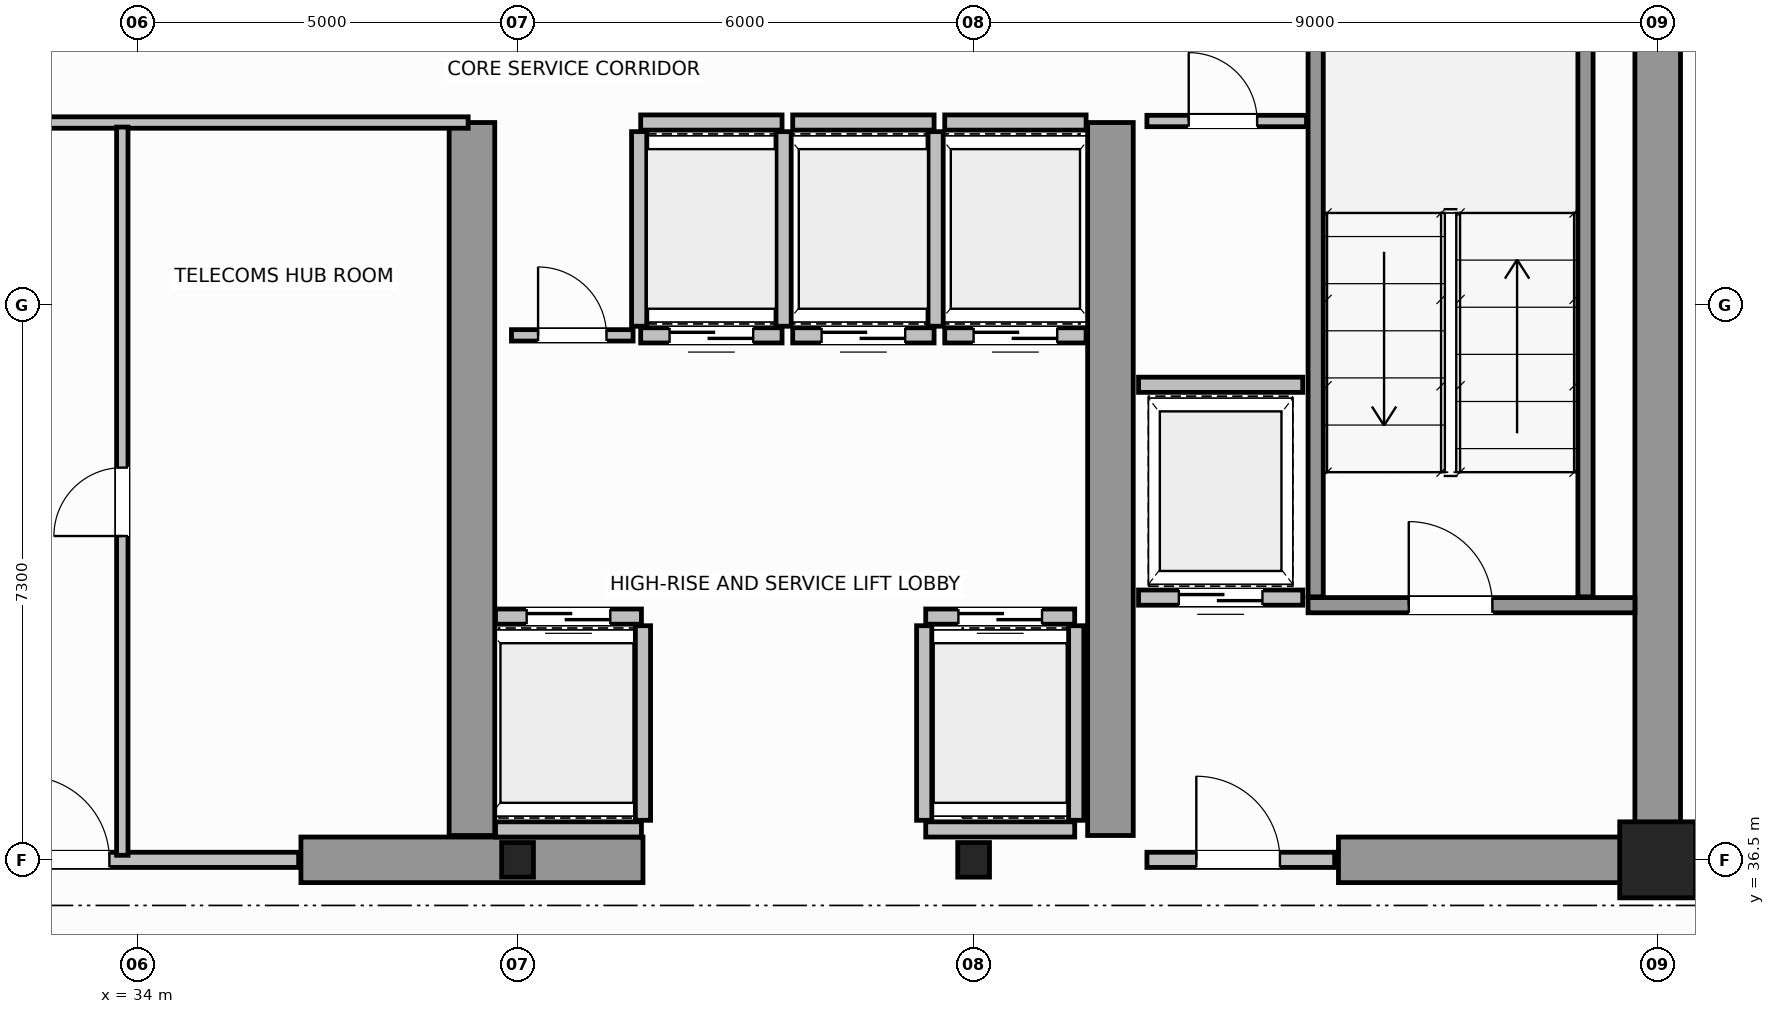
"""IFC4 building model, lengths in metres.
Left out: names, types, materials, properties, quantities, classifications, styles, units other than length and angle.
Written with IfcOpenShell. Run it as: python <this file> out.ifc"""

import sys

from ifc_helpers import new_model, si_unit, direction, frame, frame_2d, origin, origin_2d, place, context, subcontext, project, spatial, rectangle, i_section, extrude, source, transform, mapped, element, fill, save


model = new_model("IFC4")
c1 = context("Model", 3, precision=1e-05, world=origin(), true_north=direction((0.0, 1.0)))
c2 = subcontext(c1, "Body", "Model", "MODEL_VIEW")
j1 = project(units=[si_unit("LENGTHUNIT", "METRE"), si_unit("PLANEANGLEUNIT", "RADIAN")], contexts=[c1])
p1 = place(None, origin())
s1 = spatial("IfcSite", under=j1, at=p1, CompositionType="ELEMENT")
p2 = place(p1, origin())
s2 = spatial("IfcBuilding", under=s1, at=p2, CompositionType="ELEMENT")
p3 = place(p2, frame((0.0, 0.0, 238.4)))
s3 = spatial("IfcBuildingStorey", under=s2, at=p3, CompositionType="ELEMENT", Elevation=238.4)
m1 = source(origin(), c2, "Body", "SweptSolid", [
    extrude(i_section(OverallWidth=0.418, OverallDepth=0.455, WebThickness=0.042, FlangeThickness=0.058, FilletRadius=0.015, at=origin_2d()), origin(), (0.0, 0.0, 1.0), 3.8),
])
for number, where, z_axis, x_axis in (
    (1, (39.0, 36.5, 0.0), (0.0, 0.0, 1.0), (1.0, 0.0, 0.0)),
    (2, (45.0, 36.5, 0.0), (0.0, 0.0, 1.0), (1.0, 0.0, 0.0)),
):
    element("IfcColumn", number, at=place(p3, frame(where, z_axis=z_axis, x_axis=x_axis)), inside=s3, PredefinedType="COLUMN", context=c2, shape_type="MappedRepresentation", body=[
        mapped(m1, transform((0.0, 0.0, 0.0), scale=1.0)),
    ])
m2 = source(origin(), c2, "Body", "SweptSolid", [
    extrude(rectangle(XDim=1.0, YDim=1.0, at=origin_2d()), origin(), (0.0, 0.0, 1.0), 3.8),
])
p4 = place(p3, frame((54.0, 36.5, 0.0), z_axis=(0.0, 0.0, 1.0), x_axis=(1.0, 0.0, 0.0)))
e3 = element("IfcColumn", 3, at=p4, inside=s3, PredefinedType="COLUMN", context=c2, shape_type="MappedRepresentation", body=[
    mapped(m2, transform((0.0, 0.0, 0.0), scale=1.0)),
])
p5 = place(p3, frame((54.0, 36.5, 0.0), z_axis=(0.0, 0.0, 1.0), x_axis=(0.0, 1.0, 0.0)))
e4 = element("IfcWall", 4, at=p5, inside=s3, PredefinedType="SHEAR", context=c2, shape_type="SweptSolid", body=[
    extrude(rectangle(XDim=14.5, YDim=0.6, at=frame_2d((7.25, 0.0))), origin(), (0.0, 0.0, 1.0), 3.8),
])
p6 = place(p3, frame((36.15, 36.5, 0.0), z_axis=(0.0, 0.0, 1.0), x_axis=(1.0, 0.0, 0.0)))
e5 = element("IfcWall", 5, at=p6, inside=s3, PredefinedType="SHEAR", context=c2, shape_type="SweptSolid", body=[
    extrude(rectangle(XDim=4.5, YDim=0.6, at=frame_2d((2.25, 0.0))), origin(), (0.0, 0.0, 1.0), 3.8),
])
p7 = place(p3, frame((49.8, 36.5, 0.0), z_axis=(0.0, 0.0, 1.0), x_axis=(1.0, 0.0, 0.0)))
e6 = element("IfcWall", 6, at=p7, inside=s3, PredefinedType="SHEAR", context=c2, shape_type="SweptSolid", body=[
    extrude(rectangle(XDim=3.88, YDim=0.6, at=frame_2d((1.94, 0.0))), origin(), (0.0, 0.0, 1.0), 2.58),
])
for number, where, z_axis, x_axis in (
    (7, (38.4, 36.82, 0.0), (0.0, 0.0, 1.0), (0.0, 1.0, 0.0)),
    (8, (46.8, 36.82, 0.0), (0.0, 0.0, 1.0), (0.0, 1.0, 0.0)),
):
    element("IfcWall", number, at=place(p3, frame(where, z_axis=z_axis, x_axis=x_axis)), inside=s3, PredefinedType="SHEAR", context=c2, shape_type="SweptSolid", body=[
        extrude(rectangle(XDim=9.38, YDim=0.6, at=frame_2d((4.69, 0.0))), origin(), (0.0, 0.0, 1.0), 3.8),
    ])
p8 = place(p3, frame((49.4, 39.85, 0.0), z_axis=(0.0, 0.0, 1.0), x_axis=(1.0, 0.0, 0.0)))
e9 = element("IfcWall", 9, at=p8, inside=s3, PredefinedType="SOLIDWALL", context=c2, shape_type="SweptSolid", body=[
    extrude(rectangle(XDim=4.3, YDim=0.2, at=frame_2d((2.15, 0.0))), origin(), (0.0, 0.0, 1.0), 3.8),
])
p9 = place(p8, frame((1.325, 0.0, 0.0)))
e10 = element("IfcOpeningElement", 10, at=p9, cuts=e9, PredefinedType="OPENING", context=c2, shape_type="SweptSolid", body=[
    extrude(rectangle(XDim=1.1, YDim=2.15, at=frame_2d((0.55, 1.075))), frame((0.0, 0.11, 0.0), z_axis=(0.0, -1.0, 0.0), x_axis=(1.0, 0.0, 0.0)), (0.0, 0.0, 1.0), 0.22),
])
for number, where, z_axis, x_axis in (
    (11, (49.5, 39.96, 0.0), (0.0, 0.0, 1.0), (0.0, 1.0, 0.0)),
    (12, (53.05, 39.96, 0.0), (0.0, 0.0, 1.0), (0.0, 1.0, 0.0)),
):
    element("IfcWall", number, at=place(p3, frame(where, z_axis=z_axis, x_axis=x_axis)), inside=s3, PredefinedType="SOLIDWALL", context=c2, shape_type="SweptSolid", body=[
        extrude(rectangle(XDim=9.93, YDim=0.2, at=frame_2d((4.965, 0.0))), origin(), (0.0, 0.0, 1.0), 3.8),
    ])
p10 = place(p3, frame((47.28, 36.5, 0.0), z_axis=(0.0, 0.0, 1.0), x_axis=(1.0, 0.0, 0.0)))
e13 = element("IfcWall", 13, at=p10, inside=s3, PredefinedType="SOLIDWALL", context=c2, shape_type="SweptSolid", body=[
    extrude(rectangle(XDim=2.47, YDim=0.2, at=frame_2d((1.235, 0.0))), origin(), (0.0, 0.0, 1.0), 2.57),
])
p11 = place(p10, frame((0.65, 0.0, 0.0)))
e14 = element("IfcOpeningElement", 14, at=p11, cuts=e13, PredefinedType="OPENING", context=c2, shape_type="SweptSolid", body=[
    extrude(rectangle(XDim=1.1, YDim=2.15, at=frame_2d((0.55, 1.075))), frame((0.0, 0.11, 0.0), z_axis=(0.0, -1.0, 0.0), x_axis=(1.0, 0.0, 0.0)), (0.0, 0.0, 1.0), 0.22),
])
p12 = place(p3, frame((38.71, 39.7, 0.0), z_axis=(0.0, 0.0, 1.0), x_axis=(1.0, 0.0, 0.0)))
e15 = element("IfcWall", 15, at=p12, inside=s3, PredefinedType="SOLIDWALL", context=c2, shape_type="SweptSolid", body=[
    extrude(rectangle(XDim=1.92, YDim=0.2, at=frame_2d((0.96, 0.0))), origin(), (0.0, 0.0, 1.0), 3.58),
])
p13 = place(p12, frame((0.41, 0.0, 0.0)))
e16 = element("IfcOpeningElement", 16, at=p13, cuts=e15, PredefinedType="OPENING", context=c2, shape_type="SweptSolid", body=[
    extrude(rectangle(XDim=1.1, YDim=2.15, at=frame_2d((0.55, 1.075))), frame((0.0, 0.11, 0.0), z_axis=(0.0, -1.0, 0.0), x_axis=(1.0, 0.0, 0.0)), (0.0, 0.0, 1.0), 0.22),
])
p14 = place(p3, frame((38.71, 36.9, 0.0), z_axis=(0.0, 0.0, 1.0), x_axis=(1.0, 0.0, 0.0)))
e17 = element("IfcWall", 17, at=p14, inside=s3, PredefinedType="SOLIDWALL", context=c2, shape_type="SweptSolid", body=[
    extrude(rectangle(XDim=1.92, YDim=0.2, at=frame_2d((0.96, 0.0))), origin(), (0.0, 0.0, 1.0), 3.58),
])
p15 = place(p3, frame((40.65, 37.02, 0.0), z_axis=(0.0, 0.0, 1.0), x_axis=(0.0, 1.0, 0.0)))
e18 = element("IfcWall", 18, at=p15, inside=s3, PredefinedType="SOLIDWALL", context=c2, shape_type="SweptSolid", body=[
    extrude(rectangle(XDim=2.56, YDim=0.2, at=frame_2d((1.28, 0.0))), origin(), (0.0, 0.0, 1.0), 3.58),
])
p16 = place(p3, frame((44.37, 39.7, 0.0), z_axis=(0.0, 0.0, 1.0), x_axis=(1.0, 0.0, 0.0)))
e19 = element("IfcWall", 19, at=p16, inside=s3, PredefinedType="SOLIDWALL", context=c2, shape_type="SweptSolid", body=[
    extrude(rectangle(XDim=1.96, YDim=0.2, at=frame_2d((0.98, 0.0))), origin(), (0.0, 0.0, 1.0), 3.58),
])
p17 = place(p16, frame((0.43, 0.0, 0.0)))
e20 = element("IfcOpeningElement", 20, at=p17, cuts=e19, PredefinedType="OPENING", context=c2, shape_type="SweptSolid", body=[
    extrude(rectangle(XDim=1.1, YDim=2.15, at=frame_2d((0.55, 1.075))), frame((0.0, 0.11, 0.0), z_axis=(0.0, -1.0, 0.0), x_axis=(1.0, 0.0, 0.0)), (0.0, 0.0, 1.0), 0.22),
])
p18 = place(p3, frame((44.37, 36.9, 0.0), z_axis=(0.0, 0.0, 1.0), x_axis=(1.0, 0.0, 0.0)))
e21 = element("IfcWall", 21, at=p18, inside=s3, PredefinedType="SOLIDWALL", context=c2, shape_type="SweptSolid", body=[
    extrude(rectangle(XDim=1.96, YDim=0.2, at=frame_2d((0.98, 0.0))), origin(), (0.0, 0.0, 1.0), 2.57),
])
for number, where, z_axis, x_axis in (
    (22, (44.35, 37.02, 0.0), (0.0, 0.0, 1.0), (0.0, 1.0, 0.0)),
    (23, (46.35, 37.02, 0.0), (0.0, 0.0, 1.0), (0.0, 1.0, 0.0)),
):
    element("IfcWall", number, at=place(p3, frame(where, z_axis=z_axis, x_axis=x_axis)), inside=s3, PredefinedType="SOLIDWALL", context=c2, shape_type="SweptSolid", body=[
        extrude(rectangle(XDim=2.56, YDim=0.2, at=frame_2d((1.28, 0.0))), origin(), (0.0, 0.0, 1.0), 3.58),
    ])
p19 = place(p3, frame((40.62, 43.4, 0.0), z_axis=(0.0, 0.0, 1.0), x_axis=(1.0, 0.0, 0.0)))
e24 = element("IfcWall", 24, at=p19, inside=s3, PredefinedType="SOLIDWALL", context=c2, shape_type="SweptSolid", body=[
    extrude(rectangle(XDim=1.86, YDim=0.2, at=frame_2d((0.93, 0.0))), origin(), (0.0, 0.0, 1.0), 3.58),
])
p20 = place(p19, frame((0.38, 0.0, 0.0)))
e25 = element("IfcOpeningElement", 25, at=p20, cuts=e24, PredefinedType="OPENING", context=c2, shape_type="SweptSolid", body=[
    extrude(rectangle(XDim=1.1, YDim=2.15, at=frame_2d((0.55, 1.075))), frame((0.0, 0.11, 0.0), z_axis=(0.0, -1.0, 0.0), x_axis=(1.0, 0.0, 0.0)), (0.0, 0.0, 1.0), 0.22),
])
p21 = place(p3, frame((40.62, 46.2, 0.0), z_axis=(0.0, 0.0, 1.0), x_axis=(1.0, 0.0, 0.0)))
e26 = element("IfcWall", 26, at=p21, inside=s3, PredefinedType="SOLIDWALL", context=c2, shape_type="SweptSolid", body=[
    extrude(rectangle(XDim=1.86, YDim=0.2, at=frame_2d((0.93, 0.0))), origin(), (0.0, 0.0, 1.0), 3.58),
])
for number, where, z_axis, x_axis in (
    (27, (40.6, 43.52, 0.0), (0.0, 0.0, 1.0), (0.0, 1.0, 0.0)),
    (28, (42.5, 43.52, 0.0), (0.0, 0.0, 1.0), (0.0, 1.0, 0.0)),
):
    element("IfcWall", number, at=place(p3, frame(where, z_axis=z_axis, x_axis=x_axis)), inside=s3, PredefinedType="SOLIDWALL", context=c2, shape_type="SweptSolid", body=[
        extrude(rectangle(XDim=2.56, YDim=0.2, at=frame_2d((1.28, 0.0))), origin(), (0.0, 0.0, 1.0), 3.58),
    ])
p22 = place(p3, frame((42.62, 43.4, 0.0), z_axis=(0.0, 0.0, 1.0), x_axis=(1.0, 0.0, 0.0)))
e29 = element("IfcWall", 29, at=p22, inside=s3, PredefinedType="SOLIDWALL", context=c2, shape_type="SweptSolid", body=[
    extrude(rectangle(XDim=1.86, YDim=0.2, at=frame_2d((0.93, 0.0))), origin(), (0.0, 0.0, 1.0), 3.58),
])
p23 = place(p22, frame((0.38, 0.0, 0.0)))
e30 = element("IfcOpeningElement", 30, at=p23, cuts=e29, PredefinedType="OPENING", context=c2, shape_type="SweptSolid", body=[
    extrude(rectangle(XDim=1.1, YDim=2.15, at=frame_2d((0.55, 1.075))), frame((0.0, 0.11, 0.0), z_axis=(0.0, -1.0, 0.0), x_axis=(1.0, 0.0, 0.0)), (0.0, 0.0, 1.0), 0.22),
])
p24 = place(p3, frame((42.62, 46.2, 0.0), z_axis=(0.0, 0.0, 1.0), x_axis=(1.0, 0.0, 0.0)))
e31 = element("IfcWall", 31, at=p24, inside=s3, PredefinedType="SOLIDWALL", context=c2, shape_type="SweptSolid", body=[
    extrude(rectangle(XDim=1.86, YDim=0.2, at=frame_2d((0.93, 0.0))), origin(), (0.0, 0.0, 1.0), 3.58),
])
p25 = place(p3, frame((44.5, 43.52, 0.0), z_axis=(0.0, 0.0, 1.0), x_axis=(0.0, 1.0, 0.0)))
e32 = element("IfcWall", 32, at=p25, inside=s3, PredefinedType="SOLIDWALL", context=c2, shape_type="SweptSolid", body=[
    extrude(rectangle(XDim=2.56, YDim=0.2, at=frame_2d((1.28, 0.0))), origin(), (0.0, 0.0, 1.0), 3.58),
])
p26 = place(p3, frame((44.62, 43.4, 0.0), z_axis=(0.0, 0.0, 1.0), x_axis=(1.0, 0.0, 0.0)))
e33 = element("IfcWall", 33, at=p26, inside=s3, PredefinedType="SOLIDWALL", context=c2, shape_type="SweptSolid", body=[
    extrude(rectangle(XDim=1.86, YDim=0.2, at=frame_2d((0.93, 0.0))), origin(), (0.0, 0.0, 1.0), 3.58),
])
p27 = place(p26, frame((0.38, 0.0, 0.0)))
e34 = element("IfcOpeningElement", 34, at=p27, cuts=e33, PredefinedType="OPENING", context=c2, shape_type="SweptSolid", body=[
    extrude(rectangle(XDim=1.1, YDim=2.15, at=frame_2d((0.55, 1.075))), frame((0.0, 0.11, 0.0), z_axis=(0.0, -1.0, 0.0), x_axis=(1.0, 0.0, 0.0)), (0.0, 0.0, 1.0), 0.22),
])
p28 = place(p3, frame((44.62, 46.2, 0.0), z_axis=(0.0, 0.0, 1.0), x_axis=(1.0, 0.0, 0.0)))
e35 = element("IfcWall", 35, at=p28, inside=s3, PredefinedType="SOLIDWALL", context=c2, shape_type="SweptSolid", body=[
    extrude(rectangle(XDim=1.86, YDim=0.2, at=frame_2d((0.93, 0.0))), origin(), (0.0, 0.0, 1.0), 3.58),
])
p29 = place(p3, frame((47.17, 39.95, 0.0), z_axis=(0.0, 0.0, 1.0), x_axis=(1.0, 0.0, 0.0)))
e36 = element("IfcWall", 36, at=p29, inside=s3, PredefinedType="SOLIDWALL", context=c2, shape_type="SweptSolid", body=[
    extrude(rectangle(XDim=2.16, YDim=0.2, at=frame_2d((1.08, 0.0))), origin(), (0.0, 0.0, 1.0), 3.58),
])
p30 = place(p29, frame((0.53, 0.0, 0.0)))
e37 = element("IfcOpeningElement", 37, at=p30, cuts=e36, PredefinedType="OPENING", context=c2, shape_type="SweptSolid", body=[
    extrude(rectangle(XDim=1.1, YDim=2.15, at=frame_2d((0.55, 1.075))), frame((0.0, 0.11, 0.0), z_axis=(0.0, -1.0, 0.0), x_axis=(1.0, 0.0, 0.0)), (0.0, 0.0, 1.0), 0.22),
])
p31 = place(p3, frame((47.17, 42.75, 0.0), z_axis=(0.0, 0.0, 1.0), x_axis=(1.0, 0.0, 0.0)))
e38 = element("IfcWall", 38, at=p31, inside=s3, PredefinedType="SOLIDWALL", context=c2, shape_type="SweptSolid", body=[
    extrude(rectangle(XDim=2.16, YDim=0.2, at=frame_2d((1.08, 0.0))), origin(), (0.0, 0.0, 1.0), 3.58),
])
p32 = place(p3, frame((32.08, 36.5, 0.0), z_axis=(0.0, 0.0, 1.0), x_axis=(1.0, 0.0, 0.0)))
e39 = element("IfcWall", 39, at=p32, inside=s3, PredefinedType="SOLIDWALL", context=c2, shape_type="SweptSolid", body=[
    extrude(rectangle(XDim=4.04, YDim=0.2, at=frame_2d((2.02, 0.0))), origin(), (0.0, 0.0, 1.0), 3.02),
])
p33 = place(p32, frame((0.45, 0.0, 0.0)))
e40 = element("IfcOpeningElement", 40, at=p33, cuts=e39, PredefinedType="OPENING", context=c2, shape_type="SweptSolid", body=[
    extrude(rectangle(XDim=1.1, YDim=2.15, at=frame_2d((0.55, 1.075))), frame((0.0, 0.11, 0.0), z_axis=(0.0, -1.0, 0.0), x_axis=(1.0, 0.0, 0.0)), (0.0, 0.0, 1.0), 0.22),
])
p34 = place(p3, frame((29.85, 46.2, 0.0), z_axis=(0.0, 0.0, 1.0), x_axis=(1.0, 0.0, 0.0)))
e41 = element("IfcWall", 41, at=p34, inside=s3, PredefinedType="PARTITIONING", context=c2, shape_type="SweptSolid", body=[
    extrude(rectangle(XDim=8.5, YDim=0.15, at=frame_2d((4.25, 0.0))), origin(), (0.0, 0.0, 1.0), 3.58),
])
p35 = place(p3, frame((33.8, 36.56, 0.0), z_axis=(0.0, 0.0, 1.0), x_axis=(0.0, 1.0, 0.0)))
e42 = element("IfcWall", 42, at=p35, inside=s3, PredefinedType="PARTITIONING", context=c2, shape_type="SweptSolid", body=[
    extrude(rectangle(XDim=9.58, YDim=0.15, at=frame_2d((4.79, 0.0))), origin(), (0.0, 0.0, 1.0), 3.58),
])
p36 = place(p35, frame((4.2, 0.0, 0.0)))
e43 = element("IfcOpeningElement", 43, at=p36, cuts=e42, PredefinedType="OPENING", context=c2, shape_type="SweptSolid", body=[
    extrude(rectangle(XDim=0.9, YDim=2.1, at=frame_2d((0.45, 1.05))), frame((0.0, 0.085, 0.0), z_axis=(0.0, -1.0, 0.0), x_axis=(1.0, 0.0, 0.0)), (0.0, 0.0, 1.0), 0.17),
])
p37 = place(p3, frame((47.28, 46.22, 0.0), z_axis=(0.0, 0.0, 1.0), x_axis=(1.0, 0.0, 0.0)))
e44 = element("IfcWall", 44, at=p37, inside=s3, PredefinedType="PARTITIONING", context=c2, shape_type="SweptSolid", body=[
    extrude(rectangle(XDim=2.1, YDim=0.15, at=frame_2d((1.05, 0.0))), origin(), (0.0, 0.0, 1.0), 3.58),
])
p38 = place(p37, frame((0.55, 0.0, 0.0)))
e45 = element("IfcOpeningElement", 45, at=p38, cuts=e44, PredefinedType="OPENING", context=c2, shape_type="SweptSolid", body=[
    extrude(rectangle(XDim=0.9, YDim=2.1, at=frame_2d((0.45, 1.05))), frame((0.0, 0.085, 0.0), z_axis=(0.0, -1.0, 0.0), x_axis=(1.0, 0.0, 0.0)), (0.0, 0.0, 1.0), 0.17),
])
p39 = place(p3, frame((38.92, 43.4, 0.0), z_axis=(0.0, 0.0, 1.0), x_axis=(1.0, 0.0, 0.0)))
e46 = element("IfcWall", 46, at=p39, inside=s3, PredefinedType="PARTITIONING", context=c2, shape_type="SweptSolid", body=[
    extrude(rectangle(XDim=1.6, YDim=0.15, at=frame_2d((0.8, 0.0))), origin(), (0.0, 0.0, 1.0), 3.58),
])
p40 = place(p39, frame((0.35, 0.0, 0.0)))
e47 = element("IfcOpeningElement", 47, at=p40, cuts=e46, PredefinedType="OPENING", context=c2, shape_type="SweptSolid", body=[
    extrude(rectangle(XDim=0.9, YDim=2.1, at=frame_2d((0.45, 1.05))), frame((0.0, 0.085, 0.0), z_axis=(0.0, -1.0, 0.0), x_axis=(1.0, 0.0, 0.0)), (0.0, 0.0, 1.0), 0.17),
])
p41 = place(p3, frame((54.06, 36.48, 0.0), z_axis=(0.0, 0.0, 1.0), x_axis=(1.0, 0.0, 0.0)))
e48 = element("IfcWall", 48, at=p41, inside=s3, PredefinedType="PARTITIONING", context=c2, shape_type="SweptSolid", body=[
    extrude(rectangle(XDim=6.619, YDim=0.12, at=frame_2d((3.31, 0.0))), origin(), (0.0, 0.0, 1.0), 3.02),
])
p42 = place(p41, frame((2.859, 0.0, 0.0)))
e49 = element("IfcOpeningElement", 49, at=p42, cuts=e48, PredefinedType="OPENING", context=c2, shape_type="SweptSolid", body=[
    extrude(rectangle(XDim=0.9, YDim=2.15, at=frame_2d((0.45, 1.075))), frame((0.0, 0.07, 0.0), z_axis=(0.0, -1.0, 0.0), x_axis=(1.0, 0.0, 0.0)), (0.0, 0.0, 1.0), 0.14),
])
m3 = source(origin(), c2, "Body", "SweptSolid", [
    extrude(rectangle(XDim=1.1, YDim=2.15, at=frame_2d((0.55, 1.075))), frame((0.0, 0.025, 0.0), z_axis=(0.0, -1.0, 0.0), x_axis=(1.0, 0.0, 0.0)), (0.0, 0.0, 1.0), 0.05),
])
p43 = place(p9, origin())
e50 = element("IfcDoor", 50, at=p43, inside=s3, OperationType="SINGLE_SWING_RIGHT", PredefinedType="DOOR", context=c2, shape_type="MappedRepresentation", body=[
    mapped(m3, transform((0.0, 0.0, 0.0), scale=1.0)),
])
fill(e10, e50)
p44 = place(p11, origin())
e51 = element("IfcDoor", 51, at=p44, inside=s3, OperationType="SINGLE_SWING_LEFT", PredefinedType="DOOR", context=c2, shape_type="MappedRepresentation", body=[
    mapped(m3, transform((0.0, 0.0, 0.0), scale=1.0)),
])
fill(e14, e51)
p45 = place(p13, origin())
e52 = element("IfcDoor", 52, at=p45, inside=s3, OperationType="DOUBLE_DOOR_SLIDING", PredefinedType="DOOR", context=c2, shape_type="MappedRepresentation", body=[
    mapped(m3, transform((0.0, 0.0, 0.0), scale=1.0)),
])
fill(e16, e52)
p46 = place(p17, origin())
e53 = element("IfcDoor", 53, at=p46, inside=s3, OperationType="DOUBLE_DOOR_SLIDING", PredefinedType="DOOR", context=c2, shape_type="MappedRepresentation", body=[
    mapped(m3, transform((0.0, 0.0, 0.0), scale=1.0)),
])
fill(e20, e53)
p47 = place(p20, origin())
e54 = element("IfcDoor", 54, at=p47, inside=s3, OperationType="DOUBLE_DOOR_SLIDING", PredefinedType="DOOR", context=c2, shape_type="MappedRepresentation", body=[
    mapped(m3, transform((0.0, 0.0, 0.0), scale=1.0)),
])
fill(e25, e54)
p48 = place(p23, origin())
e55 = element("IfcDoor", 55, at=p48, inside=s3, OperationType="DOUBLE_DOOR_SLIDING", PredefinedType="DOOR", context=c2, shape_type="MappedRepresentation", body=[
    mapped(m3, transform((0.0, 0.0, 0.0), scale=1.0)),
])
fill(e30, e55)
p49 = place(p27, origin())
e56 = element("IfcDoor", 56, at=p49, inside=s3, OperationType="DOUBLE_DOOR_SLIDING", PredefinedType="DOOR", context=c2, shape_type="MappedRepresentation", body=[
    mapped(m3, transform((0.0, 0.0, 0.0), scale=1.0)),
])
fill(e34, e56)
p50 = place(p30, origin())
e57 = element("IfcDoor", 57, at=p50, inside=s3, OperationType="DOUBLE_DOOR_SLIDING", PredefinedType="DOOR", context=c2, shape_type="MappedRepresentation", body=[
    mapped(m3, transform((0.0, 0.0, 0.0), scale=1.0)),
])
fill(e37, e57)
p51 = place(p33, origin())
e58 = element("IfcDoor", 58, at=p51, inside=s3, OperationType="SINGLE_SWING_LEFT", PredefinedType="DOOR", context=c2, shape_type="MappedRepresentation", body=[
    mapped(m3, transform((0.0, 0.0, 0.0), scale=1.0)),
])
fill(e40, e58)
m4 = source(origin(), c2, "Body", "SweptSolid", [
    extrude(rectangle(XDim=0.9, YDim=2.1, at=frame_2d((0.45, 1.05))), frame((0.0, 0.025, 0.0), z_axis=(0.0, -1.0, 0.0), x_axis=(1.0, 0.0, 0.0)), (0.0, 0.0, 1.0), 0.05),
])
p52 = place(p36, origin())
e59 = element("IfcDoor", 59, at=p52, inside=s3, OperationType="SINGLE_SWING_RIGHT", PredefinedType="DOOR", context=c2, shape_type="MappedRepresentation", body=[
    mapped(m4, transform((0.0, 0.0, 0.0), scale=1.0)),
])
fill(e43, e59)
p53 = place(p38, origin())
e60 = element("IfcDoor", 60, at=p53, inside=s3, OperationType="SINGLE_SWING_RIGHT", PredefinedType="DOOR", context=c2, shape_type="MappedRepresentation", body=[
    mapped(m4, transform((0.0, 0.0, 0.0), scale=1.0)),
])
fill(e45, e60)
p54 = place(p40, origin())
e61 = element("IfcDoor", 61, at=p54, inside=s3, OperationType="SINGLE_SWING_LEFT", PredefinedType="DOOR", context=c2, shape_type="MappedRepresentation", body=[
    mapped(m4, transform((0.0, 0.0, 0.0), scale=1.0)),
])
fill(e47, e61)
save(model, sys.argv[1])
